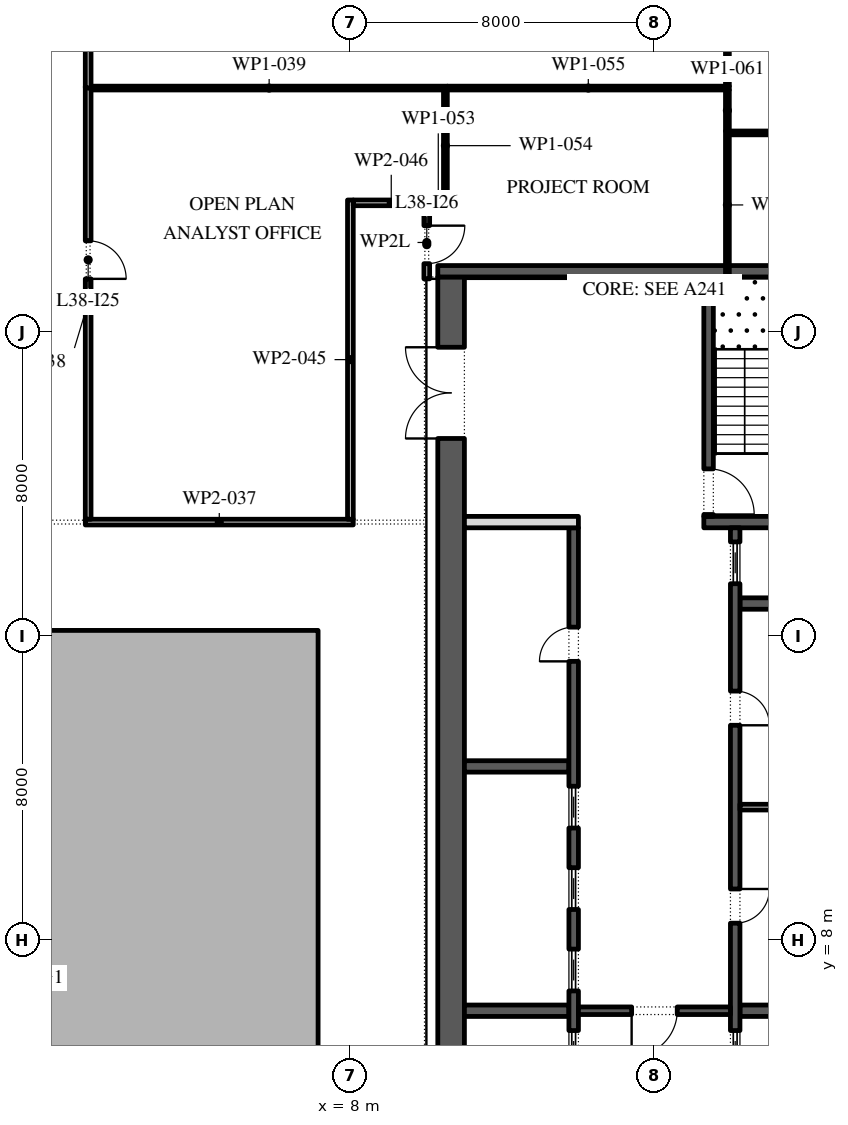
"""IFC4 building model, lengths in metres.
Left out: names, types, materials, properties, quantities, classifications, styles, units other than length and angle.
Written with IfcOpenShell. Run it as: python <this file> out.ifc"""

import sys

from ifc_helpers import new_model, si_unit, direction, frame, frame_2d, origin, place, context, subcontext, project, spatial, polyline, rectangle, outline, extrude, element, fill, save


model = new_model("IFC4")
c1 = context("Model", 3, precision=1e-05, world=origin(), true_north=direction((0.0, 1.0)))
c2 = subcontext(c1, "Body", "Model", "MODEL_VIEW")
j1 = project(units=[si_unit("LENGTHUNIT", "METRE"), si_unit("PLANEANGLEUNIT", "RADIAN")], contexts=[c1])
p1 = place(None, origin())
s1 = spatial("IfcSite", under=j1, at=p1, CompositionType="ELEMENT")
p2 = place(p1, origin())
s2 = spatial("IfcBuilding", under=s1, at=p2, CompositionType="ELEMENT")
p3 = place(p2, frame((0.0, 0.0, 175.8)))
s3 = spatial("IfcBuildingStorey", under=s2, at=p3, CompositionType="ELEMENT", Elevation=175.8)
p4 = place(p3, origin())
e1 = element("IfcWall", 1, at=p4, inside=s3, PredefinedType="STANDARD", context=c2, shape_type="SweptSolid", body=[
    extrude(outline(polyline([(-7.15, -2.15), (7.15, -2.15), (7.15, 16.15), (-7.15, 16.15), (-7.15, -2.15)]), holes=[polyline([(-7.0, -2.0), (-7.0, 16.0), (7.0, 16.0), (7.0, -2.0), (-7.0, -2.0)])]), origin(), (0.0, 0.0, 1.0), 4.0),
])
p5 = place(p3, frame((10.65, -2.45, 0.0), z_axis=(0.0, 0.0, 1.0), x_axis=(0.0, 1.0, 0.0)))
e2 = element("IfcWall", 2, at=p5, inside=s3, PredefinedType="SHEAR", context=c2, shape_type="SweptSolid", body=[
    extrude(rectangle(XDim=27.9, YDim=0.7, at=frame_2d((13.95, 0.0))), origin(), (0.0, 0.0, 1.0), 4.0),
])
p6 = place(p5, frame((23.65, 0.0, 0.0)))
e3 = element("IfcOpeningElement", 3, at=p6, cuts=e2, PredefinedType="OPENING", context=c2, shape_type="SweptSolid", body=[
    extrude(rectangle(XDim=2.4, YDim=2.1, at=frame_2d((1.2, 1.05))), frame((0.0, 0.36, 0.0), z_axis=(0.0, -1.0, 0.0), x_axis=(1.0, 0.0, 0.0)), (0.0, 0.0, 1.0), 0.72),
])
p7 = place(p5, frame((0.788, 0.0, 0.0)))
e4 = element("IfcOpeningElement", 4, at=p7, cuts=e2, PredefinedType="OPENING", context=c2, shape_type="SweptSolid", body=[
    extrude(rectangle(XDim=0.9, YDim=2.1, at=frame_2d((0.45, 1.05))), frame((0.0, 0.36, 0.0), z_axis=(0.0, -1.0, 0.0), x_axis=(1.0, 0.0, 0.0)), (0.0, 0.0, 1.0), 0.72),
])
p8 = place(p5, frame((3.962, 0.0, 0.0)))
e5 = element("IfcOpeningElement", 5, at=p8, cuts=e2, PredefinedType="OPENING", context=c2, shape_type="SweptSolid", body=[
    extrude(rectangle(XDim=1.0, YDim=2.1, at=frame_2d((0.5, 1.05))), frame((0.0, 0.36, 0.0), z_axis=(0.0, -1.0, 0.0), x_axis=(1.0, 0.0, 0.0)), (0.0, 0.0, 1.0), 0.72),
])
p9 = place(p3, frame((10.3, 25.6, 0.0), z_axis=(0.0, 0.0, 1.0), x_axis=(1.0, 0.0, 0.0)))
e6 = element("IfcWall", 6, at=p9, inside=s3, PredefinedType="SHEAR", context=c2, shape_type="SweptSolid", body=[
    extrude(rectangle(XDim=11.4, YDim=0.3, at=frame_2d((5.7, 0.0))), origin(), (0.0, 0.0, 1.0), 4.0),
])
p10 = place(p3, frame((17.3, 19.0, 0.0), z_axis=(0.0, 0.0, 1.0), x_axis=(1.0, 0.0, 0.0)))
e7 = element("IfcWall", 7, at=p10, inside=s3, PredefinedType="SHEAR", context=c2, shape_type="SweptSolid", body=[
    extrude(rectangle(XDim=3.7, YDim=0.3, at=frame_2d((1.85, 0.0))), origin(), (0.0, 0.0, 1.0), 4.0),
])
p11 = place(p3, frame((17.425, 19.15, 0.0), z_axis=(0.0, 0.0, 1.0), x_axis=(0.0, 1.0, 0.0)))
e8 = element("IfcWall", 8, at=p11, inside=s3, PredefinedType="SHEAR", context=c2, shape_type="SweptSolid", body=[
    extrude(rectangle(XDim=6.3, YDim=0.25, at=frame_2d((3.15, 0.0))), origin(), (0.0, 0.0, 1.0), 4.0),
])
p12 = place(p11, frame((0.05, 0.0, 0.0)))
e9 = element("IfcOpeningElement", 9, at=p12, cuts=e8, PredefinedType="OPENING", context=c2, shape_type="SweptSolid", body=[
    extrude(rectangle(XDim=1.2, YDim=2.1, at=frame_2d((0.6, 1.05))), frame((0.0, 0.135, 0.0), z_axis=(0.0, -1.0, 0.0), x_axis=(1.0, 0.0, 0.0)), (0.0, 0.0, 1.0), 0.27),
])
for number, where, z_axis, x_axis in (
    (10, (18.25, 6.143, 0.0), (0.0, 0.0, 1.0), (1.0, 0.0, 0.0)),
    (11, (18.25, 16.857, 0.0), (0.0, 0.0, 1.0), (1.0, 0.0, 0.0)),
):
    element("IfcWall", number, at=place(p3, frame(where, z_axis=z_axis, x_axis=x_axis)), inside=s3, PredefinedType="SHEAR", context=c2, shape_type="SweptSolid", body=[
        extrude(rectangle(XDim=2.75, YDim=0.3, at=frame_2d((1.375, 0.0))), origin(), (0.0, 0.0, 1.0), 4.0),
    ])
p13 = place(p3, frame((18.125, 4.15, 0.0), z_axis=(0.0, 0.0, 1.0), x_axis=(0.0, 1.0, 0.0)))
e12 = element("IfcWall", 12, at=p13, inside=s3, PredefinedType="SHEAR", context=c2, shape_type="SweptSolid", body=[
    extrude(rectangle(XDim=14.7, YDim=0.25, at=frame_2d((7.35, 0.0))), origin(), (0.0, 0.0, 1.0), 4.0),
])
p14 = place(p13, frame((4.296, 0.0, 0.0)))
e13 = element("IfcOpeningElement", 13, at=p14, cuts=e12, PredefinedType="OPENING", context=c2, shape_type="SweptSolid", body=[
    extrude(rectangle(XDim=0.9, YDim=2.1, at=frame_2d((0.45, 1.05))), frame((0.0, 0.135, 0.0), z_axis=(0.0, -1.0, 0.0), x_axis=(1.0, 0.0, 0.0)), (0.0, 0.0, 1.0), 0.27),
])
p15 = place(p13, frame((9.504, 0.0, 0.0)))
e14 = element("IfcOpeningElement", 14, at=p15, cuts=e12, PredefinedType="OPENING", context=c2, shape_type="SweptSolid", body=[
    extrude(rectangle(XDim=0.9, YDim=2.1, at=frame_2d((0.45, 1.05))), frame((0.0, 0.135, 0.0), z_axis=(0.0, -1.0, 0.0), x_axis=(1.0, 0.0, 0.0)), (0.0, 0.0, 1.0), 0.27),
])
p16 = place(p13, frame((0.371, 0.0, 0.0)))
e15 = element("IfcOpeningElement", 15, at=p16, cuts=e12, PredefinedType="OPENING", context=c2, shape_type="SweptSolid", body=[
    extrude(rectangle(XDim=1.1, YDim=2.1, at=frame_2d((0.55, 1.05))), frame((0.0, 0.135, 0.0), z_axis=(0.0, -1.0, 0.0), x_axis=(1.0, 0.0, 0.0)), (0.0, 0.0, 1.0), 0.27),
])
p17 = place(p13, frame((13.229, 0.0, 0.0)))
e16 = element("IfcOpeningElement", 16, at=p17, cuts=e12, PredefinedType="OPENING", context=c2, shape_type="SweptSolid", body=[
    extrude(rectangle(XDim=1.1, YDim=2.1, at=frame_2d((0.55, 1.05))), frame((0.0, 0.135, 0.0), z_axis=(0.0, -1.0, 0.0), x_axis=(1.0, 0.0, 0.0)), (0.0, 0.0, 1.0), 0.27),
])
p18 = place(p3, frame((18.25, 11.5, 0.0), z_axis=(0.0, 0.0, 1.0), x_axis=(1.0, 0.0, 0.0)))
e17 = element("IfcWall", 17, at=p18, inside=s3, PredefinedType="PARTITIONING", context=c2, shape_type="SweptSolid", body=[
    extrude(rectangle(XDim=2.75, YDim=0.15, at=frame_2d((1.375, 0.0))), origin(), (0.0, 0.0, 1.0), 4.0),
])
for number, where, z_axis, x_axis in (
    (18, (11.0, 6.143, 0.0), (0.0, 0.0, 1.0), (1.0, 0.0, 0.0)),
    (19, (11.0, 12.571, 0.0), (0.0, 0.0, 1.0), (1.0, 0.0, 0.0)),
):
    element("IfcWall", number, at=place(p3, frame(where, z_axis=z_axis, x_axis=x_axis)), inside=s3, PredefinedType="SHEAR", context=c2, shape_type="SweptSolid", body=[
        extrude(rectangle(XDim=2.75, YDim=0.3, at=frame_2d((1.375, 0.0))), origin(), (0.0, 0.0, 1.0), 4.0),
    ])
p19 = place(p3, frame((13.875, -2.45, 0.0), z_axis=(0.0, 0.0, 1.0), x_axis=(0.0, 1.0, 0.0)))
e20 = element("IfcWall", 20, at=p19, inside=s3, PredefinedType="SHEAR", context=c2, shape_type="SweptSolid", body=[
    extrude(rectangle(XDim=21.3, YDim=0.25, at=frame_2d((10.65, 0.0))), origin(), (0.0, 0.0, 1.0), 4.0),
])
p20 = place(p19, frame((17.786, 0.0, 0.0)))
e21 = element("IfcOpeningElement", 21, at=p20, cuts=e20, PredefinedType="OPENING", context=c2, shape_type="SweptSolid", body=[
    extrude(rectangle(XDim=0.9, YDim=2.1, at=frame_2d((0.45, 1.05))), frame((0.0, 0.135, 0.0), z_axis=(0.0, -1.0, 0.0), x_axis=(1.0, 0.0, 0.0)), (0.0, 0.0, 1.0), 0.27),
])
p21 = place(p19, frame((6.971, 0.0, 0.0)))
e22 = element("IfcOpeningElement", 22, at=p21, cuts=e20, PredefinedType="OPENING", context=c2, shape_type="SweptSolid", body=[
    extrude(rectangle(XDim=1.1, YDim=2.1, at=frame_2d((0.55, 1.05))), frame((0.0, 0.135, 0.0), z_axis=(0.0, -1.0, 0.0), x_axis=(1.0, 0.0, 0.0)), (0.0, 0.0, 1.0), 0.27),
])
p22 = place(p19, frame((9.114, 0.0, 0.0)))
e23 = element("IfcOpeningElement", 23, at=p22, cuts=e20, PredefinedType="OPENING", context=c2, shape_type="SweptSolid", body=[
    extrude(rectangle(XDim=1.1, YDim=2.1, at=frame_2d((0.55, 1.05))), frame((0.0, 0.135, 0.0), z_axis=(0.0, -1.0, 0.0), x_axis=(1.0, 0.0, 0.0)), (0.0, 0.0, 1.0), 0.27),
])
p23 = place(p19, frame((11.257, 0.0, 0.0)))
e24 = element("IfcOpeningElement", 24, at=p23, cuts=e20, PredefinedType="OPENING", context=c2, shape_type="SweptSolid", body=[
    extrude(rectangle(XDim=1.1, YDim=2.1, at=frame_2d((0.55, 1.05))), frame((0.0, 0.135, 0.0), z_axis=(0.0, -1.0, 0.0), x_axis=(1.0, 0.0, 0.0)), (0.0, 0.0, 1.0), 0.27),
])
p24 = place(p19, frame((13.4, 0.0, 0.0)))
e25 = element("IfcOpeningElement", 25, at=p24, cuts=e20, PredefinedType="OPENING", context=c2, shape_type="SweptSolid", body=[
    extrude(rectangle(XDim=1.1, YDim=2.1, at=frame_2d((0.55, 1.05))), frame((0.0, 0.135, 0.0), z_axis=(0.0, -1.0, 0.0), x_axis=(1.0, 0.0, 0.0)), (0.0, 0.0, 1.0), 0.27),
])
p25 = place(p3, frame((11.0, 19.0, 0.0), z_axis=(0.0, 0.0, 1.0), x_axis=(1.0, 0.0, 0.0)))
e26 = element("IfcWall", 26, at=p25, inside=s3, PredefinedType="PARTITIONING", context=c2, shape_type="SweptSolid", body=[
    extrude(rectangle(XDim=3.0, YDim=0.3, at=frame_2d((1.5, 0.0))), origin(), (0.0, 0.0, 1.0), 4.0),
])
p26 = place(p3, frame((14.0, 6.143, 0.0), z_axis=(0.0, 0.0, 1.0), x_axis=(1.0, 0.0, 0.0)))
e27 = element("IfcWall", 27, at=p26, inside=s3, PredefinedType="SHEAR", context=c2, shape_type="SweptSolid", body=[
    extrude(rectangle(XDim=4.0, YDim=0.2, at=frame_2d((2.0, 0.0))), origin(), (0.0, 0.0, 1.0), 4.0),
])
p27 = place(p26, frame((1.4, 0.0, 0.0)))
e28 = element("IfcOpeningElement", 28, at=p27, cuts=e27, PredefinedType="OPENING", context=c2, shape_type="SweptSolid", body=[
    extrude(rectangle(XDim=1.2, YDim=2.1, at=frame_2d((0.6, 1.05))), frame((0.0, 0.11, 0.0), z_axis=(0.0, -1.0, 0.0), x_axis=(1.0, 0.0, 0.0)), (0.0, 0.0, 1.0), 0.22),
])
p28 = place(p3, frame((1.025, 19.0, 0.0), z_axis=(0.0, 0.0, 1.0), x_axis=(1.0, 0.0, 0.0)))
e29 = element("IfcWall", 29, at=p28, inside=s3, PredefinedType="PARTITIONING", context=c2, shape_type="SweptSolid", body=[
    extrude(rectangle(XDim=7.05, YDim=0.15, at=frame_2d((3.525, 0.0))), origin(), (0.0, 0.0, 1.0), 4.0),
])
p29 = place(p3, frame((1.1, 30.47, 0.0), z_axis=(0.0, 0.0, 1.0), x_axis=(0.0, -1.0, 0.0)))
e30 = element("IfcWall", 30, at=p29, inside=s3, PredefinedType="PARTITIONING", context=c2, shape_type="SweptSolid", body=[
    extrude(rectangle(XDim=11.395, YDim=0.15, at=frame_2d((5.698, 0.0))), origin(), (0.0, 0.0, 1.0), 4.0),
])
p30 = place(p29, frame((4.07, 0.0, 0.0)))
e31 = element("IfcOpeningElement", 31, at=p30, cuts=e30, PredefinedType="OPENING", context=c2, shape_type="SweptSolid", body=[
    extrude(rectangle(XDim=1.0, YDim=2.1, at=frame_2d((0.5, 1.05))), frame((0.0, 0.085, 0.0), z_axis=(0.0, -1.0, 0.0), x_axis=(1.0, 0.0, 0.0)), (0.0, 0.0, 1.0), 0.17),
])
p31 = place(p3, frame((1.175, 30.42, 0.0), z_axis=(0.0, 0.0, 1.0), x_axis=(1.0, 0.0, 0.0)))
e32 = element("IfcWall", 32, at=p31, inside=s3, PredefinedType="PARTITIONING", context=c2, shape_type="SweptSolid", body=[
    extrude(rectangle(XDim=9.375, YDim=0.1, at=frame_2d((4.688, 0.0))), origin(), (0.0, 0.0, 1.0), 4.0),
])
p32 = place(p3, frame((1.1, 36.05, 0.0), z_axis=(0.0, 0.0, 1.0), x_axis=(0.0, -1.0, 0.0)))
e33 = element("IfcWall", 33, at=p32, inside=s3, PredefinedType="PARTITIONING", context=c2, shape_type="SweptSolid", body=[
    extrude(rectangle(XDim=5.63, YDim=0.15, at=frame_2d((2.815, 0.0))), origin(), (0.0, 0.0, 1.0), 4.0),
])
p33 = place(p32, frame((2.98, 0.0, 0.0)))
e34 = element("IfcOpeningElement", 34, at=p33, cuts=e33, PredefinedType="OPENING", context=c2, shape_type="SweptSolid", body=[
    extrude(rectangle(XDim=1.0, YDim=2.1, at=frame_2d((0.5, 1.05))), frame((0.0, 0.085, 0.0), z_axis=(0.0, -1.0, 0.0), x_axis=(1.0, 0.0, 0.0)), (0.0, 0.0, 1.0), 0.17),
])
p34 = place(p3, frame((8.0, 19.075, 0.0), z_axis=(0.0, 0.0, 1.0), x_axis=(0.0, 1.0, 0.0)))
e35 = element("IfcWall", 35, at=p34, inside=s3, PredefinedType="PARTITIONING", context=c2, shape_type="SweptSolid", body=[
    extrude(rectangle(XDim=8.4, YDim=0.15, at=frame_2d((4.2, 0.0))), origin(), (0.0, 0.0, 1.0), 4.0),
])
p35 = place(p3, frame((8.075, 27.4, 0.0), z_axis=(0.0, 0.0, 1.0), x_axis=(1.0, 0.0, 0.0)))
e36 = element("IfcWall", 36, at=p35, inside=s3, PredefinedType="PARTITIONING", context=c2, shape_type="SweptSolid", body=[
    extrude(rectangle(XDim=2.0, YDim=0.15, at=frame_2d((1.0, 0.0))), origin(), (0.0, 0.0, 1.0), 4.0),
])
p36 = place(p3, frame((10.01, 27.315, 0.0), z_axis=(0.0, 0.0, 1.0), x_axis=(0.0, -1.0, 0.0)))
e37 = element("IfcWall", 37, at=p36, inside=s3, PredefinedType="PARTITIONING", context=c2, shape_type="SweptSolid", body=[
    extrude(rectangle(XDim=1.915, YDim=0.15, at=frame_2d((0.958, 0.0))), origin(), (0.0, 0.0, 1.0), 3.02),
])
p37 = place(p36, frame((0.515, 0.0, 0.0)))
e38 = element("IfcOpeningElement", 38, at=p37, cuts=e37, PredefinedType="OPENING", context=c2, shape_type="SweptSolid", body=[
    extrude(rectangle(XDim=1.0, YDim=2.1, at=frame_2d((0.5, 1.05))), frame((0.0, 0.085, 0.0), z_axis=(0.0, -1.0, 0.0), x_axis=(1.0, 0.0, 0.0)), (0.0, 0.0, 1.0), 0.17),
])
p38 = place(p3, frame((10.55, 27.39, 0.0), z_axis=(0.0, 0.0, 1.0), x_axis=(-1.0, 0.0, 0.0)))
e39 = element("IfcWall", 39, at=p38, inside=s3, PredefinedType="PARTITIONING", context=c2, shape_type="SweptSolid", body=[
    extrude(rectangle(XDim=0.475, YDim=0.1, at=frame_2d((0.238, 0.0))), origin(), (0.0, 0.0, 1.0), 4.0),
])
p39 = place(p3, frame((10.5, 30.37, 0.0), z_axis=(0.0, 0.0, 1.0), x_axis=(0.0, -1.0, 0.0)))
e40 = element("IfcWall", 40, at=p39, inside=s3, PredefinedType="PARTITIONING", context=c2, shape_type="SweptSolid", body=[
    extrude(rectangle(XDim=2.93, YDim=0.1, at=frame_2d((1.465, 0.0))), origin(), (0.0, 0.0, 1.0), 4.0),
])
p40 = place(p3, frame((10.55, 30.42, 0.0), z_axis=(0.0, 0.0, 1.0), x_axis=(1.0, 0.0, 0.0)))
e41 = element("IfcWall", 41, at=p40, inside=s3, PredefinedType="PARTITIONING", context=c2, shape_type="SweptSolid", body=[
    extrude(rectangle(XDim=7.42, YDim=0.1, at=frame_2d((3.71, 0.0))), origin(), (0.0, 0.0, 1.0), 4.0),
])
p41 = place(p3, frame((17.92, 25.4, 0.0), z_axis=(0.0, 0.0, 1.0), x_axis=(0.0, 1.0, 0.0)))
e42 = element("IfcWall", 42, at=p41, inside=s3, PredefinedType="PARTITIONING", context=c2, shape_type="SweptSolid", body=[
    extrude(rectangle(XDim=3.89, YDim=0.1, at=frame_2d((1.945, 0.0))), origin(), (0.0, 0.0, 1.0), 4.0),
])
p42 = place(p3, frame((17.92, 29.29, 0.0), z_axis=(0.0, 0.0, 1.0), x_axis=(0.0, 1.0, 0.0)))
e43 = element("IfcWall", 43, at=p42, inside=s3, PredefinedType="PARTITIONING", context=c2, shape_type="SweptSolid", body=[
    extrude(rectangle(XDim=1.08, YDim=0.1, at=frame_2d((0.54, 0.0))), origin(), (0.0, 0.0, 1.0), 4.0),
])
p43 = place(p3, frame((17.97, 29.24, 0.0), z_axis=(0.0, 0.0, 1.0), x_axis=(1.0, 0.0, 0.0)))
e44 = element("IfcWall", 44, at=p43, inside=s3, PredefinedType="PARTITIONING", context=c2, shape_type="SweptSolid", body=[
    extrude(rectangle(XDim=4.04, YDim=0.1, at=frame_2d((2.02, 0.0))), origin(), (0.0, 0.0, 1.0), 4.0),
])
p44 = place(p3, frame((17.92, 30.47, 0.0), z_axis=(0.0, 0.0, 1.0), x_axis=(0.0, 1.0, 0.0)))
e45 = element("IfcWall", 45, at=p44, inside=s3, PredefinedType="PARTITIONING", context=c2, shape_type="SweptSolid", body=[
    extrude(rectangle(XDim=5.48, YDim=0.1, at=frame_2d((2.74, 0.0))), origin(), (0.0, 0.0, 1.0), 4.0),
])
p45 = place(p14, frame((0.9, -0.2, 0.0), z_axis=(0.0, 0.0, 1.0), x_axis=(-1.0, 0.0, 0.0)))
e46 = element("IfcDoor", 46, at=p45, inside=s3, OperationType="SINGLE_SWING_RIGHT", PredefinedType="DOOR", context=c2, shape_type="SweptSolid", body=[
    extrude(rectangle(XDim=0.9, YDim=2.1, at=frame_2d((0.45, 1.05))), frame((0.0, -0.075, 0.0), z_axis=(0.0, -1.0, 0.0), x_axis=(1.0, 0.0, 0.0)), (0.0, 0.0, 1.0), 0.05),
])
fill(e13, e46)
p46 = place(p15, frame((0.9, -0.2, 0.0), z_axis=(0.0, 0.0, 1.0), x_axis=(-1.0, 0.0, 0.0)))
e47 = element("IfcDoor", 47, at=p46, inside=s3, OperationType="SINGLE_SWING_LEFT", PredefinedType="DOOR", context=c2, shape_type="SweptSolid", body=[
    extrude(rectangle(XDim=0.9, YDim=2.1, at=frame_2d((0.45, 1.05))), frame((0.0, -0.075, 0.0), z_axis=(0.0, -1.0, 0.0), x_axis=(1.0, 0.0, 0.0)), (0.0, 0.0, 1.0), 0.05),
])
fill(e14, e47)
p47 = place(p16, origin())
e48 = element("IfcDoor", 48, at=p47, inside=s3, OperationType="SLIDING_TO_LEFT", PredefinedType="DOOR", context=c2, shape_type="SweptSolid", body=[
    extrude(rectangle(XDim=1.1, YDim=2.1, at=frame_2d((0.55, 1.05))), frame((0.0, 0.025, 0.0), z_axis=(0.0, -1.0, 0.0), x_axis=(1.0, 0.0, 0.0)), (0.0, 0.0, 1.0), 0.05),
])
fill(e15, e48)
p48 = place(p17, origin())
e49 = element("IfcDoor", 49, at=p48, inside=s3, OperationType="SLIDING_TO_LEFT", PredefinedType="DOOR", context=c2, shape_type="SweptSolid", body=[
    extrude(rectangle(XDim=1.1, YDim=2.1, at=frame_2d((0.55, 1.05))), frame((0.0, 0.025, 0.0), z_axis=(0.0, -1.0, 0.0), x_axis=(1.0, 0.0, 0.0)), (0.0, 0.0, 1.0), 0.05),
])
fill(e16, e49)
p49 = place(p20, origin())
e50 = element("IfcDoor", 50, at=p49, inside=s3, OperationType="SINGLE_SWING_RIGHT", PredefinedType="DOOR", context=c2, shape_type="SweptSolid", body=[
    extrude(rectangle(XDim=0.9, YDim=2.1, at=frame_2d((0.45, 1.05))), frame((0.0, 0.125, 0.0), z_axis=(0.0, -1.0, 0.0), x_axis=(1.0, 0.0, 0.0)), (0.0, 0.0, 1.0), 0.05),
])
fill(e21, e50)
p50 = place(p21, origin())
e51 = element("IfcDoor", 51, at=p50, inside=s3, OperationType="SLIDING_TO_LEFT", PredefinedType="DOOR", context=c2, shape_type="SweptSolid", body=[
    extrude(rectangle(XDim=1.1, YDim=2.1, at=frame_2d((0.55, 1.05))), frame((0.0, 0.025, 0.0), z_axis=(0.0, -1.0, 0.0), x_axis=(1.0, 0.0, 0.0)), (0.0, 0.0, 1.0), 0.05),
])
fill(e22, e51)
p51 = place(p22, origin())
e52 = element("IfcDoor", 52, at=p51, inside=s3, OperationType="SLIDING_TO_LEFT", PredefinedType="DOOR", context=c2, shape_type="SweptSolid", body=[
    extrude(rectangle(XDim=1.1, YDim=2.1, at=frame_2d((0.55, 1.05))), frame((0.0, 0.025, 0.0), z_axis=(0.0, -1.0, 0.0), x_axis=(1.0, 0.0, 0.0)), (0.0, 0.0, 1.0), 0.05),
])
fill(e23, e52)
p52 = place(p23, origin())
e53 = element("IfcDoor", 53, at=p52, inside=s3, OperationType="SLIDING_TO_LEFT", PredefinedType="DOOR", context=c2, shape_type="SweptSolid", body=[
    extrude(rectangle(XDim=1.1, YDim=2.1, at=frame_2d((0.55, 1.05))), frame((0.0, 0.025, 0.0), z_axis=(0.0, -1.0, 0.0), x_axis=(1.0, 0.0, 0.0)), (0.0, 0.0, 1.0), 0.05),
])
fill(e24, e53)
p53 = place(p24, origin())
e54 = element("IfcDoor", 54, at=p53, inside=s3, OperationType="SLIDING_TO_LEFT", PredefinedType="DOOR", context=c2, shape_type="SweptSolid", body=[
    extrude(rectangle(XDim=1.1, YDim=2.1, at=frame_2d((0.55, 1.05))), frame((0.0, 0.025, 0.0), z_axis=(0.0, -1.0, 0.0), x_axis=(1.0, 0.0, 0.0)), (0.0, 0.0, 1.0), 0.05),
])
fill(e25, e54)
p54 = place(p27, frame((1.2, 0.0, 0.0), z_axis=(0.0, 0.0, 1.0), x_axis=(-1.0, 0.0, 0.0)))
e55 = element("IfcDoor", 55, at=p54, inside=s3, OperationType="SINGLE_SWING_LEFT", PredefinedType="DOOR", context=c2, shape_type="SweptSolid", body=[
    extrude(rectangle(XDim=1.2, YDim=2.1, at=frame_2d((0.6, 1.05))), frame((0.0, 0.025, 0.0), z_axis=(0.0, -1.0, 0.0), x_axis=(1.0, 0.0, 0.0)), (0.0, 0.0, 1.0), 0.05),
])
fill(e28, e55)
p55 = place(p6, origin())
e56 = element("IfcDoor", 56, at=p55, inside=s3, OperationType="DOUBLE_DOOR_SINGLE_SWING", PredefinedType="DOOR", context=c2, shape_type="SweptSolid", body=[
    extrude(rectangle(XDim=2.4, YDim=2.1, at=frame_2d((1.2, 1.05))), frame((0.0, 0.025, 0.0), z_axis=(0.0, -1.0, 0.0), x_axis=(1.0, 0.0, 0.0)), (0.0, 0.0, 1.0), 0.05),
])
fill(e3, e56)
p56 = place(p12, frame((1.2, 0.0, 0.0), z_axis=(0.0, 0.0, 1.0), x_axis=(-1.0, 0.0, 0.0)))
e57 = element("IfcDoor", 57, at=p56, inside=s3, OperationType="SINGLE_SWING_LEFT", PredefinedType="DOOR", context=c2, shape_type="SweptSolid", body=[
    extrude(rectangle(XDim=1.2, YDim=2.1, at=frame_2d((0.6, 1.05))), frame((0.0, 0.025, 0.0), z_axis=(0.0, -1.0, 0.0), x_axis=(1.0, 0.0, 0.0)), (0.0, 0.0, 1.0), 0.05),
])
fill(e9, e57)
p57 = place(p30, origin())
e58 = element("IfcDoor", 58, at=p57, inside=s3, OperationType="SINGLE_SWING_LEFT", PredefinedType="DOOR", context=c2, shape_type="SweptSolid", body=[
    extrude(rectangle(XDim=1.0, YDim=2.1, at=frame_2d((0.5, 1.05))), frame((0.0, 0.025, 0.0), z_axis=(0.0, -1.0, 0.0), x_axis=(1.0, 0.0, 0.0)), (0.0, 0.0, 1.0), 0.05),
])
fill(e31, e58)
p58 = place(p37, origin())
e59 = element("IfcDoor", 59, at=p58, inside=s3, OperationType="SINGLE_SWING_RIGHT", PredefinedType="DOOR", context=c2, shape_type="SweptSolid", body=[
    extrude(rectangle(XDim=1.0, YDim=2.1, at=frame_2d((0.5, 1.05))), frame((0.0, 0.025, 0.0), z_axis=(0.0, -1.0, 0.0), x_axis=(1.0, 0.0, 0.0)), (0.0, 0.0, 1.0), 0.05),
])
fill(e38, e59)
save(model, sys.argv[1])
